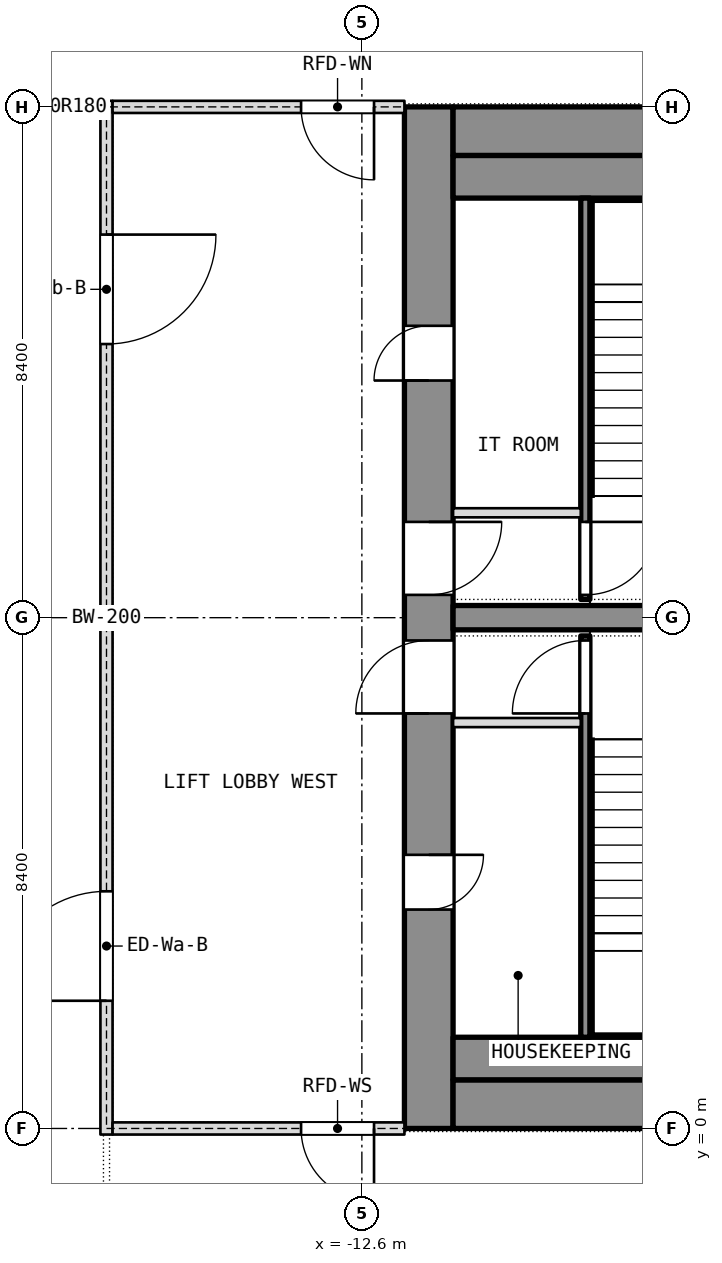
"""IFC4 building model, lengths in metres.
Left out: names, types, materials, properties, quantities, classifications, styles, units other than length and angle.
Written with IfcOpenShell. Run it as: python <this file> out.ifc"""

import sys

from ifc_helpers import new_model, si_unit, direction, frame, frame_2d, origin, place, context, subcontext, project, spatial, rectangle, extrude, element, fill, save


model = new_model("IFC4")
c1 = context("Model", 3, precision=1e-05, world=origin(), true_north=direction((0.0, 1.0)))
c2 = subcontext(c1, "Body", "Model", "MODEL_VIEW")
j1 = project(units=[si_unit("LENGTHUNIT", "METRE"), si_unit("PLANEANGLEUNIT", "RADIAN")], contexts=[c1])
p1 = place(None, origin())
s1 = spatial("IfcSite", under=j1, at=p1, CompositionType="ELEMENT")
p2 = place(p1, origin())
s2 = spatial("IfcBuilding", under=s1, at=p2, CompositionType="ELEMENT")
p3 = place(p2, frame((0.0, 0.0, 216.5)))
s3 = spatial("IfcBuildingStorey", under=s2, at=p3, CompositionType="ELEMENT", Elevation=216.5)
p4 = place(p3, frame((-11.5, 0.0, 0.0), z_axis=(0.0, 0.0, 1.0), x_axis=(0.0, 1.0, 0.0)))
e1 = element("IfcWall", 1, at=p4, inside=s3, PredefinedType="SHEAR", context=c2, shape_type="SweptSolid", body=[
    extrude(rectangle(XDim=16.8, YDim=0.8, at=frame_2d((8.4, 0.0))), origin(), (0.0, 0.0, 1.0), 3.6),
])
p5 = place(p4, frame((3.6, 0.0, 0.0)))
e2 = element("IfcOpeningElement", 2, at=p5, cuts=e1, PredefinedType="OPENING", context=c2, shape_type="SweptSolid", body=[
    extrude(rectangle(XDim=0.9, YDim=2.1, at=frame_2d((0.45, 1.05))), frame((0.0, 0.4, 0.0), z_axis=(0.0, -1.0, 0.0), x_axis=(1.0, 0.0, 0.0)), (0.0, 0.0, 1.0), 0.8),
])
p6 = place(p4, frame((6.825, 0.0, 0.0)))
e3 = element("IfcOpeningElement", 3, at=p6, cuts=e1, PredefinedType="OPENING", context=c2, shape_type="SweptSolid", body=[
    extrude(rectangle(XDim=1.2, YDim=2.1, at=frame_2d((0.6, 1.05))), frame((0.0, 0.4, 0.0), z_axis=(0.0, -1.0, 0.0), x_axis=(1.0, 0.0, 0.0)), (0.0, 0.0, 1.0), 0.8),
])
p7 = place(p4, frame((12.3, 0.0, 0.0)))
e4 = element("IfcOpeningElement", 4, at=p7, cuts=e1, PredefinedType="OPENING", context=c2, shape_type="SweptSolid", body=[
    extrude(rectangle(XDim=0.9, YDim=2.1, at=frame_2d((0.45, 1.05))), frame((0.0, 0.4, 0.0), z_axis=(0.0, -1.0, 0.0), x_axis=(1.0, 0.0, 0.0)), (0.0, 0.0, 1.0), 0.8),
])
p8 = place(p4, frame((8.775, 0.0, 0.0)))
e5 = element("IfcOpeningElement", 5, at=p8, cuts=e1, PredefinedType="OPENING", context=c2, shape_type="SweptSolid", body=[
    extrude(rectangle(XDim=1.2, YDim=2.1, at=frame_2d((0.6, 1.05))), frame((0.0, 0.4, 0.0), z_axis=(0.0, -1.0, 0.0), x_axis=(1.0, 0.0, 0.0)), (0.0, 0.0, 1.0), 0.8),
])
p9 = place(p3, frame((-11.1, 0.4, 0.0), z_axis=(0.0, 0.0, 1.0), x_axis=(1.0, 0.0, 0.0)))
e6 = element("IfcWall", 6, at=p9, inside=s3, PredefinedType="SHEAR", context=c2, shape_type="SweptSolid", body=[
    extrude(rectangle(XDim=22.2, YDim=0.8, at=frame_2d((11.1, 0.0))), origin(), (0.0, 0.0, 1.0), 3.6),
])
p10 = place(p9, frame((10.85, 0.0, 0.0)))
e7 = element("IfcOpeningElement", 7, at=p10, cuts=e6, PredefinedType="OPENING", context=c2, shape_type="SweptSolid", body=[
    extrude(rectangle(XDim=1.4, YDim=2.1, at=frame_2d((0.7, 1.05))), frame((0.0, 0.4, 0.0), z_axis=(0.0, -1.0, 0.0), x_axis=(1.0, 0.0, 0.0)), (0.0, 0.0, 1.0), 0.8),
])
p11 = place(p3, frame((-11.1, 16.4, 0.0), z_axis=(0.0, 0.0, 1.0), x_axis=(1.0, 0.0, 0.0)))
e8 = element("IfcWall", 8, at=p11, inside=s3, PredefinedType="SHEAR", context=c2, shape_type="SweptSolid", body=[
    extrude(rectangle(XDim=22.2, YDim=0.8, at=frame_2d((11.1, 0.0))), origin(), (0.0, 0.0, 1.0), 3.6),
])
p12 = place(p11, frame((10.4, 0.0, 0.0)))
e9 = element("IfcOpeningElement", 9, at=p12, cuts=e8, PredefinedType="OPENING", context=c2, shape_type="SweptSolid", body=[
    extrude(rectangle(XDim=1.4, YDim=2.1, at=frame_2d((0.7, 1.05))), frame((0.0, 0.4, 0.0), z_axis=(0.0, -1.0, 0.0), x_axis=(1.0, 0.0, 0.0)), (0.0, 0.0, 1.0), 0.8),
])
p13 = place(p3, frame((-11.1, 8.4, 0.0), z_axis=(0.0, 0.0, 1.0), x_axis=(1.0, 0.0, 0.0)))
e10 = element("IfcWall", 10, at=p13, inside=s3, PredefinedType="SHEAR", context=c2, shape_type="SweptSolid", body=[
    extrude(rectangle(XDim=6.7, YDim=0.4, at=frame_2d((3.35, 0.0))), origin(), (0.0, 0.0, 1.0), 3.6),
])
p14 = place(p3, frame((-18.4, 16.8, 0.0), z_axis=(0.0, 0.0, 1.0), x_axis=(1.0, 0.0, 0.0)))
e11 = element("IfcWall", 11, at=p14, inside=s3, PredefinedType="PARTITIONING", context=c2, shape_type="SweptSolid", body=[
    extrude(rectangle(XDim=1.5, YDim=0.2, at=frame_2d((0.75, 0.0))), origin(), (0.0, 0.0, 1.0), 2.94),
])
p15 = place(p3, frame((-11.1, 1.15, 0.0), z_axis=(0.0, 0.0, 1.0), x_axis=(1.0, 0.0, 0.0)))
e12 = element("IfcWall", 12, at=p15, inside=s3, PredefinedType="PARTITIONING", context=c2, shape_type="SweptSolid", body=[
    extrude(rectangle(XDim=10.85, YDim=0.7, at=frame_2d((5.425, 0.0))), origin(), (0.0, 0.0, 1.0), 3.34),
])
p16 = place(p3, frame((-11.1, 15.65, 0.0), z_axis=(0.0, 0.0, 1.0), x_axis=(1.0, 0.0, 0.0)))
e13 = element("IfcWall", 13, at=p16, inside=s3, PredefinedType="PARTITIONING", context=c2, shape_type="SweptSolid", body=[
    extrude(rectangle(XDim=10.2, YDim=0.7, at=frame_2d((5.1, 0.0))), origin(), (0.0, 0.0, 1.0), 3.34),
])
p17 = place(p3, frame((-8.925, 1.5, 0.0), z_axis=(0.0, 0.0, 1.0), x_axis=(0.0, 1.0, 0.0)))
e14 = element("IfcWall", 14, at=p17, inside=s3, PredefinedType="SHEAR", context=c2, shape_type="SweptSolid", body=[
    extrude(rectangle(XDim=6.6, YDim=0.15, at=frame_2d((3.3, 0.0))), origin(), (0.0, 0.0, 1.0), 3.34),
])
p18 = place(p17, frame((5.325, 0.0, 0.0)))
e15 = element("IfcOpeningElement", 15, at=p18, cuts=e14, PredefinedType="OPENING", context=c2, shape_type="SweptSolid", body=[
    extrude(rectangle(XDim=1.2, YDim=2.1, at=frame_2d((0.6, 1.05))), frame((0.0, 0.075, 0.0), z_axis=(0.0, -1.0, 0.0), x_axis=(1.0, 0.0, 0.0)), (0.0, 0.0, 1.0), 0.15),
])
p19 = place(p3, frame((-11.1, 6.675, 0.0), z_axis=(0.0, 0.0, 1.0), x_axis=(1.0, 0.0, 0.0)))
e16 = element("IfcWall", 16, at=p19, inside=s3, PredefinedType="PARTITIONING", context=c2, shape_type="SweptSolid", body=[
    extrude(rectangle(XDim=2.1, YDim=0.15, at=frame_2d((1.05, 0.0))), origin(), (0.0, 0.0, 1.0), 3.34),
])
p20 = place(p3, frame((-8.925, 8.7, 0.0), z_axis=(0.0, 0.0, 1.0), x_axis=(0.0, 1.0, 0.0)))
e17 = element("IfcWall", 17, at=p20, inside=s3, PredefinedType="SHEAR", context=c2, shape_type="SweptSolid", body=[
    extrude(rectangle(XDim=6.6, YDim=0.15, at=frame_2d((3.3, 0.0))), origin(), (0.0, 0.0, 1.0), 3.34),
])
p21 = place(p20, frame((0.075, 0.0, 0.0)))
e18 = element("IfcOpeningElement", 18, at=p21, cuts=e17, PredefinedType="OPENING", context=c2, shape_type="SweptSolid", body=[
    extrude(rectangle(XDim=1.2, YDim=2.1, at=frame_2d((0.6, 1.05))), frame((0.0, 0.075, 0.0), z_axis=(0.0, -1.0, 0.0), x_axis=(1.0, 0.0, 0.0)), (0.0, 0.0, 1.0), 0.15),
])
p22 = place(p3, frame((-11.1, 10.125, 0.0), z_axis=(0.0, 0.0, 1.0), x_axis=(1.0, 0.0, 0.0)))
e19 = element("IfcWall", 19, at=p22, inside=s3, PredefinedType="PARTITIONING", context=c2, shape_type="SweptSolid", body=[
    extrude(rectangle(XDim=2.1, YDim=0.15, at=frame_2d((1.05, 0.0))), origin(), (0.0, 0.0, 1.0), 3.34),
])
p23 = place(p3, frame((-16.8, -0.1, 0.0), z_axis=(0.0, 0.0, 1.0), x_axis=(0.0, 1.0, 0.0)))
e20 = element("IfcWall", 20, at=p23, inside=s3, PredefinedType="PARTITIONING", context=c2, shape_type="SweptSolid", body=[
    extrude(rectangle(XDim=17.0, YDim=0.2, at=frame_2d((8.5, 0.0))), origin(), (0.0, 0.0, 1.0), 3.34),
])
p24 = place(p23, frame((2.2, 0.0, 0.0)))
e21 = element("IfcOpeningElement", 21, at=p24, cuts=e20, PredefinedType="OPENING", context=c2, shape_type="SweptSolid", body=[
    extrude(rectangle(XDim=1.8, YDim=2.1, at=frame_2d((0.9, 1.05))), frame((0.0, 0.1, 0.0), z_axis=(0.0, -1.0, 0.0), x_axis=(1.0, 0.0, 0.0)), (0.0, 0.0, 1.0), 0.2),
])
p25 = place(p23, frame((13.0, 0.0, 0.0)))
e22 = element("IfcOpeningElement", 22, at=p25, cuts=e20, PredefinedType="OPENING", context=c2, shape_type="SweptSolid", body=[
    extrude(rectangle(XDim=1.8, YDim=2.1, at=frame_2d((0.9, 1.05))), frame((0.0, 0.1, 0.0), z_axis=(0.0, -1.0, 0.0), x_axis=(1.0, 0.0, 0.0)), (0.0, 0.0, 1.0), 0.2),
])
p26 = place(p3, frame((-16.7, 0.0, 0.0), z_axis=(0.0, 0.0, 1.0), x_axis=(1.0, 0.0, 0.0)))
e23 = element("IfcWall", 23, at=p26, inside=s3, PredefinedType="PARTITIONING", context=c2, shape_type="SweptSolid", body=[
    extrude(rectangle(XDim=4.8, YDim=0.2, at=frame_2d((2.4, 0.0))), origin(), (0.0, 0.0, 1.0), 2.94),
])
p27 = place(p26, frame((3.1, 0.0, 0.0)))
e24 = element("IfcOpeningElement", 24, at=p27, cuts=e23, PredefinedType="OPENING", context=c2, shape_type="SweptSolid", body=[
    extrude(rectangle(XDim=1.2, YDim=2.1, at=frame_2d((0.6, 1.05))), frame((0.0, 0.1, 0.0), z_axis=(0.0, -1.0, 0.0), x_axis=(1.0, 0.0, 0.0)), (0.0, 0.0, 1.0), 0.2),
])
p28 = place(p3, frame((-16.7, 16.8, 0.0), z_axis=(0.0, 0.0, 1.0), x_axis=(1.0, 0.0, 0.0)))
e25 = element("IfcWall", 25, at=p28, inside=s3, PredefinedType="PARTITIONING", context=c2, shape_type="SweptSolid", body=[
    extrude(rectangle(XDim=4.8, YDim=0.2, at=frame_2d((2.4, 0.0))), origin(), (0.0, 0.0, 1.0), 2.94),
])
p29 = place(p28, frame((3.1, 0.0, 0.0)))
e26 = element("IfcOpeningElement", 26, at=p29, cuts=e25, PredefinedType="OPENING", context=c2, shape_type="SweptSolid", body=[
    extrude(rectangle(XDim=1.2, YDim=2.1, at=frame_2d((0.6, 1.05))), frame((0.0, 0.1, 0.0), z_axis=(0.0, -1.0, 0.0), x_axis=(1.0, 0.0, 0.0)), (0.0, 0.0, 1.0), 0.2),
])
p30 = place(p5, origin())
e27 = element("IfcDoor", 27, at=p30, inside=s3, OperationType="SINGLE_SWING_LEFT", PredefinedType="DOOR", context=c2, shape_type="SweptSolid", body=[
    extrude(rectangle(XDim=0.9, YDim=2.1, at=frame_2d((0.45, 1.05))), frame((0.0, 0.025, 0.0), z_axis=(0.0, -1.0, 0.0), x_axis=(1.0, 0.0, 0.0)), (0.0, 0.0, 1.0), 0.05),
])
fill(e2, e27)
p31 = place(p6, origin())
e28 = element("IfcDoor", 28, at=p31, inside=s3, OperationType="SINGLE_SWING_LEFT", PredefinedType="DOOR", context=c2, shape_type="SweptSolid", body=[
    extrude(rectangle(XDim=1.2, YDim=2.1, at=frame_2d((0.6, 1.05))), frame((0.0, 0.025, 0.0), z_axis=(0.0, -1.0, 0.0), x_axis=(1.0, 0.0, 0.0)), (0.0, 0.0, 1.0), 0.05),
])
fill(e3, e28)
p32 = place(p18, origin())
e29 = element("IfcDoor", 29, at=p32, inside=s3, OperationType="SINGLE_SWING_LEFT", PredefinedType="DOOR", context=c2, shape_type="SweptSolid", body=[
    extrude(rectangle(XDim=1.2, YDim=2.1, at=frame_2d((0.6, 1.05))), frame((0.0, 0.025, 0.0), z_axis=(0.0, -1.0, 0.0), x_axis=(1.0, 0.0, 0.0)), (0.0, 0.0, 1.0), 0.05),
])
fill(e15, e29)
p33 = place(p7, origin())
e30 = element("IfcDoor", 30, at=p33, inside=s3, OperationType="SINGLE_SWING_LEFT", PredefinedType="DOOR", context=c2, shape_type="SweptSolid", body=[
    extrude(rectangle(XDim=0.9, YDim=2.1, at=frame_2d((0.45, 1.05))), frame((0.0, 0.025, 0.0), z_axis=(0.0, -1.0, 0.0), x_axis=(1.0, 0.0, 0.0)), (0.0, 0.0, 1.0), 0.05),
])
fill(e4, e30)
p34 = place(p8, origin())
e31 = element("IfcDoor", 31, at=p34, inside=s3, OperationType="SINGLE_SWING_LEFT", PredefinedType="DOOR", context=c2, shape_type="SweptSolid", body=[
    extrude(rectangle(XDim=1.2, YDim=2.1, at=frame_2d((0.6, 1.05))), frame((0.0, 0.025, 0.0), z_axis=(0.0, -1.0, 0.0), x_axis=(1.0, 0.0, 0.0)), (0.0, 0.0, 1.0), 0.05),
])
fill(e5, e31)
p35 = place(p21, origin())
e32 = element("IfcDoor", 32, at=p35, inside=s3, OperationType="SINGLE_SWING_LEFT", PredefinedType="DOOR", context=c2, shape_type="SweptSolid", body=[
    extrude(rectangle(XDim=1.2, YDim=2.1, at=frame_2d((0.6, 1.05))), frame((0.0, 0.025, 0.0), z_axis=(0.0, -1.0, 0.0), x_axis=(1.0, 0.0, 0.0)), (0.0, 0.0, 1.0), 0.05),
])
fill(e18, e32)
p36 = place(p24, origin())
e33 = element("IfcDoor", 33, at=p36, inside=s3, OperationType="DOUBLE_DOOR_SINGLE_SWING", PredefinedType="DOOR", context=c2, shape_type="SweptSolid", body=[
    extrude(rectangle(XDim=1.8, YDim=2.1, at=frame_2d((0.9, 1.05))), frame((0.0, 0.025, 0.0), z_axis=(0.0, -1.0, 0.0), x_axis=(1.0, 0.0, 0.0)), (0.0, 0.0, 1.0), 0.05),
])
fill(e21, e33)
p37 = place(p25, origin())
e34 = element("IfcDoor", 34, at=p37, inside=s3, OperationType="DOUBLE_DOOR_SINGLE_SWING", PredefinedType="DOOR", context=c2, shape_type="SweptSolid", body=[
    extrude(rectangle(XDim=1.8, YDim=2.1, at=frame_2d((0.9, 1.05))), frame((0.0, 0.025, 0.0), z_axis=(0.0, -1.0, 0.0), x_axis=(1.0, 0.0, 0.0)), (0.0, 0.0, 1.0), 0.05),
])
fill(e22, e34)
p38 = place(p27, origin())
e35 = element("IfcDoor", 35, at=p38, inside=s3, OperationType="SINGLE_SWING_LEFT", PredefinedType="DOOR", context=c2, shape_type="SweptSolid", body=[
    extrude(rectangle(XDim=1.2, YDim=2.1, at=frame_2d((0.6, 1.05))), frame((0.0, 0.025, 0.0), z_axis=(0.0, -1.0, 0.0), x_axis=(1.0, 0.0, 0.0)), (0.0, 0.0, 1.0), 0.05),
])
fill(e24, e35)
p39 = place(p29, origin())
e36 = element("IfcDoor", 36, at=p39, inside=s3, OperationType="SINGLE_SWING_LEFT", PredefinedType="DOOR", context=c2, shape_type="SweptSolid", body=[
    extrude(rectangle(XDim=1.2, YDim=2.1, at=frame_2d((0.6, 1.05))), frame((0.0, 0.025, 0.0), z_axis=(0.0, -1.0, 0.0), x_axis=(1.0, 0.0, 0.0)), (0.0, 0.0, 1.0), 0.05),
])
fill(e26, e36)
save(model, sys.argv[1])
